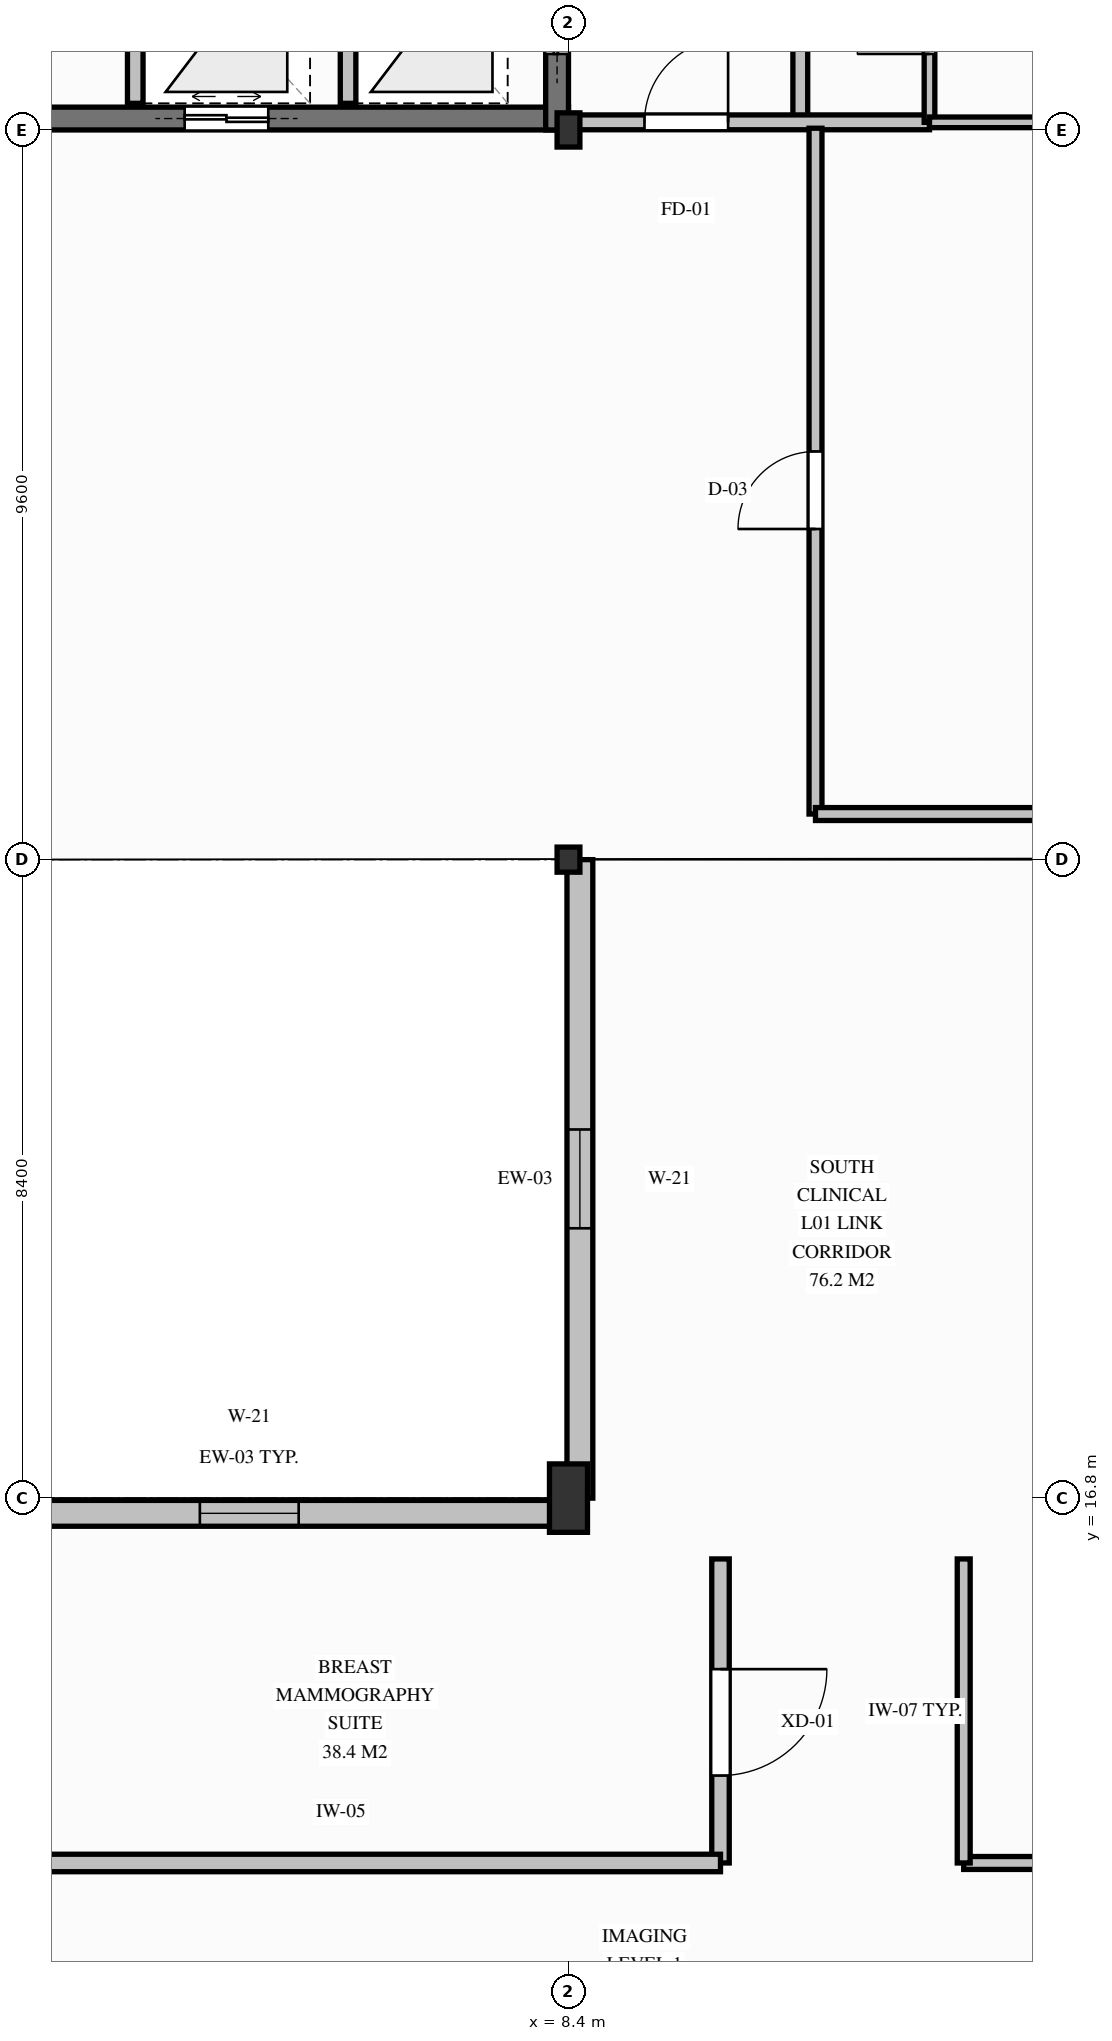
"""IFC4 building model, lengths in metres.
Left out: names, types, materials, properties, quantities, classifications, styles, units other than length and angle.
Written with IfcOpenShell. Run it as: python <this file> out.ifc"""

import sys

from ifc_helpers import new_model, si_unit, direction, frame, frame_2d, origin, origin_2d, place, context, subcontext, project, spatial, rectangle, i_section, extrude, element, fill, save


model = new_model("IFC4")
c1 = context("Model", 3, precision=1e-05, world=origin(), true_north=direction((0.0, 1.0)))
c2 = subcontext(c1, "Body", "Model", "MODEL_VIEW")
j1 = project(units=[si_unit("LENGTHUNIT", "METRE"), si_unit("PLANEANGLEUNIT", "RADIAN")], contexts=[c1])
p1 = place(None, origin())
s1 = spatial("IfcSite", under=j1, at=p1, CompositionType="ELEMENT")
p2 = place(p1, origin())
s2 = spatial("IfcBuilding", under=s1, at=p2, CompositionType="ELEMENT")
p3 = place(p2, frame((0.0, 0.0, 4.5)))
s3 = spatial("IfcBuildingStorey", under=s2, at=p3, CompositionType="ELEMENT", Elevation=4.5)
p4 = place(p3, frame((0.0, 34.95, 0.0), z_axis=(0.0, 0.0, 1.0), x_axis=(1.0, 0.0, 0.0)))
e1 = element("IfcWall", 1, at=p4, inside=s3, PredefinedType="SHEAR", context=c2, shape_type="SweptSolid", body=[
    extrude(rectangle(XDim=8.4, YDim=0.3, at=frame_2d((4.2, 0.0))), origin(), (0.0, 0.0, 1.0), 4.5),
])
p5 = place(p4, frame((3.35, 0.0, 0.0)))
e2 = element("IfcOpeningElement", 2, at=p5, cuts=e1, PredefinedType="OPENING", context=c2, shape_type="SweptSolid", body=[
    extrude(rectangle(XDim=1.1, YDim=2.1, at=frame_2d((0.55, 1.05))), frame((0.0, 0.16, 0.0), z_axis=(0.0, -1.0, 0.0), x_axis=(1.0, 0.0, 0.0)), (0.0, 0.0, 1.0), 0.32),
])
p6 = place(p3, frame((8.25, 34.8, 0.0), z_axis=(0.0, 0.0, 1.0), x_axis=(0.0, 1.0, 0.0)))
e3 = element("IfcWall", 3, at=p6, inside=s3, PredefinedType="SHEAR", context=c2, shape_type="SweptSolid", body=[
    extrude(rectangle(XDim=8.0, YDim=0.3, at=frame_2d((4.0, 0.0))), origin(), (0.0, 0.0, 1.0), 4.5),
])
p7 = place(p6, frame((2.95, 0.0, 0.0)))
e4 = element("IfcOpeningElement", 4, at=p7, cuts=e3, PredefinedType="OPENING", context=c2, shape_type="SweptSolid", body=[
    extrude(rectangle(XDim=1.1, YDim=2.15, at=frame_2d((0.55, 1.075))), frame((0.0, 0.16, 0.0), z_axis=(0.0, -1.0, 0.0), x_axis=(1.0, 0.0, 0.0)), (0.0, 0.0, 1.0), 0.32),
])
p8 = place(p6, frame((1.0, 0.0, 0.0)))
e5 = element("IfcOpeningElement", 5, at=p8, cuts=e3, PredefinedType="OPENING", context=c2, shape_type="SweptSolid", body=[
    extrude(rectangle(XDim=1.1, YDim=2.1, at=frame_2d((0.55, 1.05))), frame((0.0, 0.16, 0.0), z_axis=(0.0, -1.0, 0.0), x_axis=(1.0, 0.0, 0.0)), (0.0, 0.0, 1.0), 0.32),
])
p9 = place(p3, frame((8.4, 16.8, 0.0), z_axis=(0.0, 0.0, 1.0), x_axis=(1.0, 0.0, 0.0)))
e6 = element("IfcColumn", 6, at=p9, inside=s3, PredefinedType="COLUMN", context=c2, shape_type="SweptSolid", body=[
    extrude(rectangle(XDim=0.5, YDim=0.9, at=origin_2d()), origin(), (0.0, 0.0, 1.0), 4.5),
])
p10 = place(p3, frame((8.4, 25.2, 0.0), z_axis=(0.0, 0.0, 1.0), x_axis=(1.0, 0.0, 0.0)))
e7 = element("IfcColumn", 7, at=p10, inside=s3, PredefinedType="COLUMN", context=c2, shape_type="SweptSolid", body=[
    extrude(i_section(OverallWidth=0.3, OverallDepth=0.33, WebThickness=0.01, FlangeThickness=0.017, FilletRadius=0.027, at=origin_2d()), origin(), (0.0, 0.0, 1.0), 4.5),
])
p11 = place(p3, frame((8.4, 34.8, 0.0), z_axis=(0.0, 0.0, 1.0), x_axis=(1.0, 0.0, 0.0)))
e8 = element("IfcColumn", 8, at=p11, inside=s3, PredefinedType="COLUMN", context=c2, shape_type="SweptSolid", body=[
    extrude(i_section(OverallWidth=0.3, OverallDepth=0.45, WebThickness=0.014, FlangeThickness=0.026, FilletRadius=0.027, at=origin_2d()), origin(), (0.0, 0.0, 1.0), 4.5),
])
p12 = place(p3, frame((0.0, 16.6, 0.0), z_axis=(0.0, 0.0, 1.0), x_axis=(1.0, 0.0, 0.0)))
e9 = element("IfcWall", 9, at=p12, inside=s3, PredefinedType="SOLIDWALL", context=c2, shape_type="SweptSolid", body=[
    extrude(rectangle(XDim=8.4, YDim=0.34, at=frame_2d((4.2, 0.0))), origin(), (0.0, 0.0, 1.0), 3.628),
])
p13 = place(p12, frame((3.55, 0.0, 0.85)))
e10 = element("IfcOpeningElement", 10, at=p13, cuts=e9, PredefinedType="OPENING", context=c2, shape_type="SweptSolid", body=[
    extrude(rectangle(XDim=1.3, YDim=1.65, at=frame_2d((0.65, 0.825))), frame((0.0, 0.18, 0.0), z_axis=(0.0, -1.0, 0.0), x_axis=(1.0, 0.0, 0.0)), (0.0, 0.0, 1.0), 0.36),
])
p14 = place(p3, frame((8.55, 16.8, 0.0), z_axis=(0.0, 0.0, 1.0), x_axis=(0.0, 1.0, 0.0)))
e11 = element("IfcWall", 11, at=p14, inside=s3, PredefinedType="SOLIDWALL", context=c2, shape_type="SweptSolid", body=[
    extrude(rectangle(XDim=8.4, YDim=0.34, at=frame_2d((4.2, 0.0))), origin(), (0.0, 0.0, 1.0), 3.628),
])
p15 = place(p14, frame((3.55, 0.0, 0.85)))
e12 = element("IfcOpeningElement", 12, at=p15, cuts=e11, PredefinedType="OPENING", context=c2, shape_type="SweptSolid", body=[
    extrude(rectangle(XDim=1.3, YDim=1.65, at=frame_2d((0.65, 0.825))), frame((0.0, 0.18, 0.0), z_axis=(0.0, -1.0, 0.0), x_axis=(1.0, 0.0, 0.0)), (0.0, 0.0, 1.0), 0.36),
])
for number, where, z_axis, x_axis in (
    (13, (5.5, 35.15, 0.0), (0.0, 0.0, 1.0), (0.0, 1.0, 0.0)),
    (14, (2.7, 35.15, 0.0), (0.0, 0.0, 1.0), (0.0, 1.0, 0.0)),
):
    element("IfcWall", number, at=place(p3, frame(where, z_axis=z_axis, x_axis=x_axis)), inside=s3, PredefinedType="PARTITIONING", context=c2, shape_type="SweptSolid", body=[
        extrude(rectangle(XDim=2.4, YDim=0.205, at=frame_2d((1.2, 0.0))), origin(), (0.0, 0.0, 1.0), 4.23),
    ])
p16 = place(p3, frame((11.45, 34.9, 0.0), z_axis=(0.0, 0.0, 1.0), x_axis=(0.0, 1.0, 0.0)))
e15 = element("IfcWall", 15, at=p16, inside=s3, PredefinedType="PARTITIONING", context=c2, shape_type="SweptSolid", body=[
    extrude(rectangle(XDim=2.65, YDim=0.195, at=frame_2d((1.325, 0.0))), origin(), (0.0, 0.0, 1.0), 3.978),
])
p17 = place(p3, frame((8.35, 34.9, 0.0), z_axis=(0.0, 0.0, 1.0), x_axis=(1.0, 0.0, 0.0)))
e16 = element("IfcWall", 16, at=p17, inside=s3, PredefinedType="PARTITIONING", context=c2, shape_type="SweptSolid", body=[
    extrude(rectangle(XDim=4.8, YDim=0.195, at=frame_2d((2.4, 0.0))), origin(), (0.0, 0.0, 1.0), 3.778),
])
p18 = place(p17, frame((1.05, 0.0, 0.0)))
e17 = element("IfcOpeningElement", 17, at=p18, cuts=e16, PredefinedType="OPENING", context=c2, shape_type="SweptSolid", body=[
    extrude(rectangle(XDim=1.1, YDim=2.15, at=frame_2d((0.55, 1.075))), frame((0.0, 0.107, 0.0), z_axis=(0.0, -1.0, 0.0), x_axis=(1.0, 0.0, 0.0)), (0.0, 0.0, 1.0), 0.215),
])
p19 = place(p3, frame((13.15, 34.9, 0.0), z_axis=(0.0, 0.0, 1.0), x_axis=(0.0, 1.0, 0.0)))
e18 = element("IfcWall", 18, at=p19, inside=s3, PredefinedType="PARTITIONING", context=c2, shape_type="SweptSolid", body=[
    extrude(rectangle(XDim=7.82, YDim=0.14, at=frame_2d((3.91, 0.0))), origin(), (0.0, 0.0, 1.0), 3.978),
])
p20 = place(p19, frame((0.9, 0.0, 0.0)))
e19 = element("IfcOpeningElement", 19, at=p20, cuts=e18, PredefinedType="OPENING", context=c2, shape_type="SweptSolid", body=[
    extrude(rectangle(XDim=0.95, YDim=2.12, at=frame_2d((0.475, 1.06))), frame((0.0, 0.08, 0.0), z_axis=(0.0, -1.0, 0.0), x_axis=(1.0, 0.0, 0.0)), (0.0, 0.0, 1.0), 0.16),
])
p21 = place(p19, frame((3.55, 0.0, 0.0)))
e20 = element("IfcOpeningElement", 20, at=p21, cuts=e18, PredefinedType="OPENING", context=c2, shape_type="SweptSolid", body=[
    extrude(rectangle(XDim=0.98, YDim=2.14, at=frame_2d((0.49, 1.07))), frame((0.0, 0.08, 0.0), z_axis=(0.0, -1.0, 0.0), x_axis=(1.0, 0.0, 0.0)), (0.0, 0.0, 1.0), 0.16),
])
p22 = place(p19, frame((6.08, 0.0, 0.0)))
e21 = element("IfcOpeningElement", 21, at=p22, cuts=e18, PredefinedType="OPENING", context=c2, shape_type="SweptSolid", body=[
    extrude(rectangle(XDim=0.98, YDim=2.14, at=frame_2d((0.49, 1.07))), frame((0.0, 0.08, 0.0), z_axis=(0.0, -1.0, 0.0), x_axis=(1.0, 0.0, 0.0)), (0.0, 0.0, 1.0), 0.16),
])
p23 = place(p3, frame((13.15, 34.9, 0.0), z_axis=(0.0, 0.0, 1.0), x_axis=(1.0, 0.0, 0.0)))
e22 = element("IfcWall", 22, at=p23, inside=s3, PredefinedType="PARTITIONING", context=c2, shape_type="SweptSolid", body=[
    extrude(rectangle(XDim=3.45, YDim=0.14, at=frame_2d((1.725, 0.0))), origin(), (0.0, 0.0, 1.0), 3.628),
])
p24 = place(p3, frame((10.4, 16.0, 0.0), z_axis=(0.0, 0.0, 1.0), x_axis=(0.0, -1.0, 0.0)))
e23 = element("IfcWall", 23, at=p24, inside=s3, PredefinedType="PARTITIONING", context=c2, shape_type="SweptSolid", body=[
    extrude(rectangle(XDim=4.0, YDim=0.23, at=frame_2d((2.0, 0.0))), origin(), (0.0, 0.0, 1.0), 4.028),
])
p25 = place(p24, frame((1.45, 0.0, 0.0)))
e24 = element("IfcOpeningElement", 24, at=p25, cuts=e23, PredefinedType="OPENING", context=c2, shape_type="SweptSolid", body=[
    extrude(rectangle(XDim=1.4, YDim=2.2, at=frame_2d((0.7, 1.1))), frame((0.0, 0.125, 0.0), z_axis=(0.0, -1.0, 0.0), x_axis=(1.0, 0.0, 0.0)), (0.0, 0.0, 1.0), 0.25),
])
p26 = place(p3, frame((10.4, 12.0, 0.0), z_axis=(0.0, 0.0, 1.0), x_axis=(-1.0, 0.0, 0.0)))
e25 = element("IfcWall", 25, at=p26, inside=s3, PredefinedType="PARTITIONING", context=c2, shape_type="SweptSolid", body=[
    extrude(rectangle(XDim=9.99, YDim=0.23, at=frame_2d((4.995, 0.0))), origin(), (0.0, 0.0, 1.0), 3.678),
])
p27 = place(p3, frame((22.8, 12.0, 0.0), z_axis=(0.0, 0.0, 1.0), x_axis=(-1.0, 0.0, 0.0)))
e26 = element("IfcWall", 26, at=p27, inside=s3, PredefinedType="PARTITIONING", context=c2, shape_type="SweptSolid", body=[
    extrude(rectangle(XDim=9.2, YDim=0.17, at=frame_2d((4.6, 0.0))), origin(), (0.0, 0.0, 1.0), 3.948),
])
p28 = place(p27, frame((4.05, 0.0, 0.0)))
e27 = element("IfcOpeningElement", 27, at=p28, cuts=e26, PredefinedType="OPENING", context=c2, shape_type="SweptSolid", body=[
    extrude(rectangle(XDim=1.28, YDim=2.22, at=frame_2d((0.64, 1.11))), frame((0.0, 0.095, 0.0), z_axis=(0.0, -1.0, 0.0), x_axis=(1.0, 0.0, 0.0)), (0.0, 0.0, 1.0), 0.19),
])
p29 = place(p3, frame((13.6, 12.0, 0.0), z_axis=(0.0, 0.0, 1.0), x_axis=(0.0, 1.0, 0.0)))
e28 = element("IfcWall", 28, at=p29, inside=s3, PredefinedType="PARTITIONING", context=c2, shape_type="SweptSolid", body=[
    extrude(rectangle(XDim=4.0, YDim=0.17, at=frame_2d((2.0, 0.0))), origin(), (0.0, 0.0, 1.0), 4.028),
])
p30 = place(p3, frame((11.65, 25.8, 0.0), z_axis=(0.0, 0.0, 1.0), x_axis=(0.0, 1.0, 0.0)))
e29 = element("IfcWall", 29, at=p30, inside=s3, PredefinedType="PARTITIONING", context=c2, shape_type="SweptSolid", body=[
    extrude(rectangle(XDim=9.022, YDim=0.17, at=frame_2d((4.511, 0.0))), origin(), (0.0, 0.0, 1.0), 3.928),
])
p31 = place(p30, frame((3.75, 0.0, 0.0)))
e30 = element("IfcOpeningElement", 30, at=p31, cuts=e29, PredefinedType="OPENING", context=c2, shape_type="SweptSolid", body=[
    extrude(rectangle(XDim=1.02, YDim=2.15, at=frame_2d((0.51, 1.075))), frame((0.0, 0.095, 0.0), z_axis=(0.0, -1.0, 0.0), x_axis=(1.0, 0.0, 0.0)), (0.0, 0.0, 1.0), 0.19),
])
p32 = place(p3, frame((33.2, 25.8, 0.0), z_axis=(0.0, 0.0, 1.0), x_axis=(-1.0, 0.0, 0.0)))
e31 = element("IfcWall", 31, at=p32, inside=s3, PredefinedType="PARTITIONING", context=c2, shape_type="SweptSolid", body=[
    extrude(rectangle(XDim=21.55, YDim=0.17, at=frame_2d((10.775, 0.0))), origin(), (0.0, 0.0, 1.0), 3.678),
])
p33 = place(p13, origin())
e32 = element("IfcWindow", 32, at=p33, inside=s3, PartitioningType="SINGLE_PANEL", PredefinedType="WINDOW", context=c2, shape_type="SweptSolid", body=[
    extrude(rectangle(XDim=1.3, YDim=1.65, at=frame_2d((0.65, 0.825))), frame((0.0, 0.03, 0.0), z_axis=(0.0, -1.0, 0.0), x_axis=(1.0, 0.0, 0.0)), (0.0, 0.0, 1.0), 0.06),
])
fill(e10, e32)
p34 = place(p15, origin())
e33 = element("IfcWindow", 33, at=p34, inside=s3, PartitioningType="SINGLE_PANEL", PredefinedType="WINDOW", context=c2, shape_type="SweptSolid", body=[
    extrude(rectangle(XDim=1.3, YDim=1.65, at=frame_2d((0.65, 0.825))), frame((0.0, 0.03, 0.0), z_axis=(0.0, -1.0, 0.0), x_axis=(1.0, 0.0, 0.0)), (0.0, 0.0, 1.0), 0.06),
])
fill(e12, e33)
p35 = place(p8, origin())
e34 = element("IfcDoor", 34, at=p35, inside=s3, OperationType="DOUBLE_DOOR_SLIDING", PredefinedType="DOOR", context=c2, shape_type="SweptSolid", body=[
    extrude(rectangle(XDim=1.1, YDim=2.1, at=frame_2d((0.55, 1.05))), frame((0.0, 0.025, 0.0), z_axis=(0.0, -1.0, 0.0), x_axis=(1.0, 0.0, 0.0)), (0.0, 0.0, 1.0), 0.05),
])
fill(e5, e34)
p36 = place(p5, origin())
e35 = element("IfcDoor", 35, at=p36, inside=s3, OperationType="DOUBLE_DOOR_SLIDING", PredefinedType="DOOR", context=c2, shape_type="SweptSolid", body=[
    extrude(rectangle(XDim=1.1, YDim=2.1, at=frame_2d((0.55, 1.05))), frame((0.0, 0.025, 0.0), z_axis=(0.0, -1.0, 0.0), x_axis=(1.0, 0.0, 0.0)), (0.0, 0.0, 1.0), 0.05),
])
fill(e2, e35)
p37 = place(p18, origin())
e36 = element("IfcDoor", 36, at=p37, inside=s3, OperationType="SINGLE_SWING_RIGHT", PredefinedType="DOOR", context=c2, shape_type="SweptSolid", body=[
    extrude(rectangle(XDim=1.1, YDim=2.15, at=frame_2d((0.55, 1.075))), frame((0.0, 0.025, 0.0), z_axis=(0.0, -1.0, 0.0), x_axis=(1.0, 0.0, 0.0)), (0.0, 0.0, 1.0), 0.05),
])
fill(e17, e36)
p38 = place(p20, origin())
e37 = element("IfcDoor", 37, at=p38, inside=s3, OperationType="SINGLE_SWING_LEFT", PredefinedType="DOOR", context=c2, shape_type="SweptSolid", body=[
    extrude(rectangle(XDim=0.95, YDim=2.12, at=frame_2d((0.475, 1.06))), frame((0.0, 0.025, 0.0), z_axis=(0.0, -1.0, 0.0), x_axis=(1.0, 0.0, 0.0)), (0.0, 0.0, 1.0), 0.05),
])
fill(e19, e37)
p39 = place(p25, origin())
e38 = element("IfcDoor", 38, at=p39, inside=s3, OperationType="SINGLE_SWING_LEFT", PredefinedType="DOOR", context=c2, shape_type="SweptSolid", body=[
    extrude(rectangle(XDim=1.4, YDim=2.2, at=frame_2d((0.7, 1.1))), frame((0.0, 0.025, 0.0), z_axis=(0.0, -1.0, 0.0), x_axis=(1.0, 0.0, 0.0)), (0.0, 0.0, 1.0), 0.05),
])
fill(e24, e38)
p40 = place(p31, origin())
e39 = element("IfcDoor", 39, at=p40, inside=s3, OperationType="SINGLE_SWING_LEFT", PredefinedType="DOOR", context=c2, shape_type="SweptSolid", body=[
    extrude(rectangle(XDim=1.02, YDim=2.15, at=frame_2d((0.51, 1.075))), frame((0.0, 0.025, 0.0), z_axis=(0.0, -1.0, 0.0), x_axis=(1.0, 0.0, 0.0)), (0.0, 0.0, 1.0), 0.05),
])
fill(e30, e39)
save(model, sys.argv[1])
